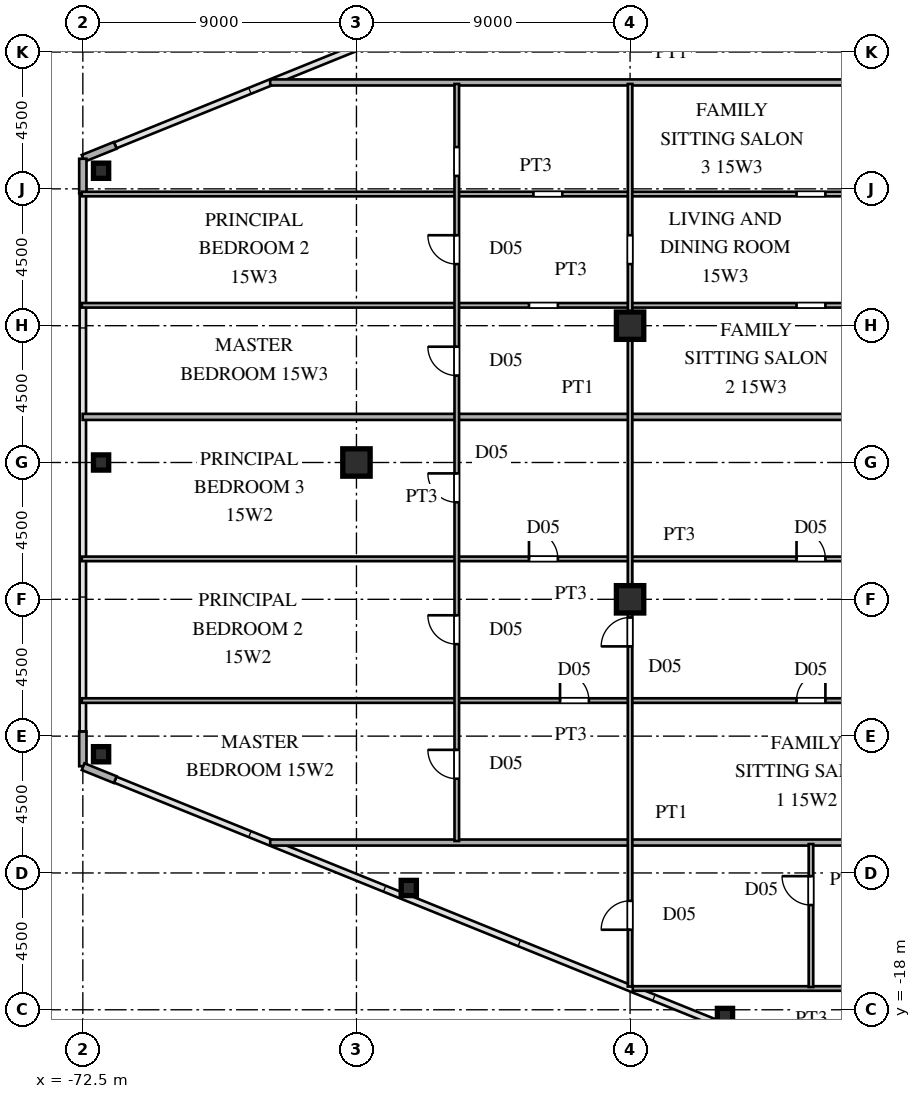
"""IFC4 building model, lengths in metres.
Left out: names, types, materials, properties, quantities, classifications, styles, units other than length and angle.
Written with IfcOpenShell. Run it as: python <this file> out.ifc"""

import sys

from ifc_helpers import new_model, si_unit, direction, frame, frame_2d, origin, origin_2d, place, context, subcontext, project, spatial, rectangle, hollow_rectangle, i_section, extrude, source, transform, mapped, element, fill, save


model = new_model("IFC4")
c1 = context("Model", 3, precision=1e-05, world=origin(), true_north=direction((0.0, 1.0)))
c2 = subcontext(c1, "Body", "Model", "MODEL_VIEW")
j1 = project(units=[si_unit("LENGTHUNIT", "METRE"), si_unit("PLANEANGLEUNIT", "RADIAN")], contexts=[c1])
p1 = place(None, origin())
s1 = spatial("IfcSite", under=j1, at=p1, CompositionType="ELEMENT")
p2 = place(p1, origin())
s2 = spatial("IfcBuilding", under=s1, at=p2, CompositionType="ELEMENT")
p3 = place(p2, frame((0.0, 0.0, 58.5)))
s3 = spatial("IfcBuildingStorey", under=s2, at=p3, CompositionType="ELEMENT", Elevation=58.5)
m1 = source(origin(), c2, "Body", "SweptSolid", [
    extrude(i_section(OverallWidth=0.9, OverallDepth=0.9, WebThickness=0.036, FlangeThickness=0.055, at=origin_2d()), origin(), (0.0, 0.0, 1.0), 3.6),
])
for number, where, z_axis, x_axis in (
    (1, (-54.5, -4.5, 0.0), (0.0, 0.0, 1.0), (1.0, 0.0, 0.0)),
    (2, (-54.5, 4.5, 0.0), (0.0, 0.0, 1.0), (1.0, 0.0, 0.0)),
    (3, (-63.5, 0.0, 0.0), (0.0, 0.0, 1.0), (1.0, 0.0, 0.0)),
):
    element("IfcColumn", number, at=place(p3, frame(where, z_axis=z_axis, x_axis=x_axis)), inside=s3, PredefinedType="COLUMN", context=c2, shape_type="MappedRepresentation", body=[
        mapped(m1, transform((0.0, 0.0, 0.0), scale=1.0)),
    ])
m2 = source(origin(), c2, "Body", "SweptSolid", [
    extrude(hollow_rectangle(XDim=0.5, YDim=0.5, WallThickness=0.02, at=origin_2d()), origin(), (0.0, 0.0, 1.0), 3.6),
])
for number, where, z_axis, x_axis in (
    (4, (-71.9, 9.596, 0.0), (0.0, 0.0, 1.0), (1.0, 0.0, 0.0)),
    (5, (-71.9, -9.596, 0.0), (0.0, 0.0, 1.0), (1.0, 0.0, 0.0)),
    (6, (-51.378, -18.204, 0.0), (0.0, 0.0, 1.0), (1.0, 0.0, 0.0)),
    (7, (-61.779, -13.994, 0.0), (0.0, 0.0, 1.0), (1.0, 0.0, 0.0)),
    (8, (-71.9, 0.0, 0.0), (0.0, 0.0, 1.0), (1.0, 0.0, 0.0)),
):
    element("IfcColumn", number, at=place(p3, frame(where, z_axis=z_axis, x_axis=x_axis)), inside=s3, PredefinedType="COLUMN", context=c2, shape_type="MappedRepresentation", body=[
        mapped(m2, transform((0.0, 0.0, 0.0), scale=1.0)),
    ])
for number, where, z_axis, x_axis in (
    (9, (-71.434, 10.431, 0.0), (0.0, 0.0, 1.0), (-0.927, -0.375, 0.0)),
    (10, (-72.5, 9.99, 0.0), (0.0, 0.0, 1.0), (0.0, -1.0, 0.0)),
    (11, (-72.5, -8.85, 0.0), (0.0, 0.0, 1.0), (0.0, -1.0, 0.0)),
    (12, (-72.491, -10.004, 0.0), (0.0, 0.0, 1.0), (0.927, -0.375, 0.0)),
):
    element("IfcWall", number, at=place(p3, frame(where, z_axis=z_axis, x_axis=x_axis)), inside=s3, PredefinedType="SOLIDWALL", context=c2, shape_type="SweptSolid", body=[
        extrude(rectangle(XDim=1.14, YDim=0.24, at=frame_2d((0.57, 0.0))), origin(), (0.0, 0.0, 1.0), 3.38),
    ])
p4 = place(p3, frame((-54.412, -17.3, 0.0), z_axis=(0.0, 0.0, 1.0), x_axis=(1.0, 0.0, 0.0)))
e13 = element("IfcWall", 13, at=p4, inside=s3, PredefinedType="PARTITIONING", context=c2, shape_type="SweptSolid", body=[
    extrude(rectangle(XDim=11.762, YDim=0.15, at=frame_2d((5.881, 0.0))), origin(), (0.0, 0.0, 1.0), 3.38),
])
p5 = place(p4, frame((8.362, 0.0, 0.0)))
e14 = element("IfcOpeningElement", 14, at=p5, cuts=e13, PredefinedType="OPENING", context=c2, shape_type="SweptSolid", body=[
    extrude(rectangle(XDim=0.95, YDim=2.15, at=frame_2d((0.475, 1.075))), frame((0.0, 0.085, 0.0), z_axis=(0.0, -1.0, 0.0), x_axis=(1.0, 0.0, 0.0)), (0.0, 0.0, 1.0), 0.17),
])
p6 = place(p3, frame((-66.337, -12.5, 0.0), z_axis=(0.0, 0.0, 1.0), x_axis=(1.0, 0.0, 0.0)))
e15 = element("IfcWall", 15, at=p6, inside=s3, PredefinedType="PARTITIONING", context=c2, shape_type="SweptSolid", body=[
    extrude(rectangle(XDim=26.407, YDim=0.2, at=frame_2d((13.204, 0.0))), origin(), (0.0, 0.0, 1.0), 3.38),
])
p7 = place(p3, frame((-72.535, -7.83, 0.0), z_axis=(0.0, 0.0, 1.0), x_axis=(1.0, 0.0, 0.0)))
e16 = element("IfcWall", 16, at=p7, inside=s3, PredefinedType="PARTITIONING", context=c2, shape_type="SweptSolid", body=[
    extrude(rectangle(XDim=29.885, YDim=0.15, at=frame_2d((14.942, 0.0))), origin(), (0.0, 0.0, 1.0), 3.38),
])
p8 = place(p7, frame((23.51, 0.0, 0.0)))
e17 = element("IfcOpeningElement", 17, at=p8, cuts=e16, PredefinedType="OPENING", context=c2, shape_type="SweptSolid", body=[
    extrude(rectangle(XDim=0.95, YDim=2.15, at=frame_2d((0.475, 1.075))), frame((0.0, 0.085, 0.0), z_axis=(0.0, -1.0, 0.0), x_axis=(1.0, 0.0, 0.0)), (0.0, 0.0, 1.0), 0.17),
])
p9 = place(p7, frame((15.731, 0.0, 0.0)))
e18 = element("IfcOpeningElement", 18, at=p9, cuts=e16, PredefinedType="OPENING", context=c2, shape_type="SweptSolid", body=[
    extrude(rectangle(XDim=0.95, YDim=2.15, at=frame_2d((0.475, 1.075))), frame((0.0, 0.085, 0.0), z_axis=(0.0, -1.0, 0.0), x_axis=(1.0, 0.0, 0.0)), (0.0, 0.0, 1.0), 0.17),
])
p10 = place(p3, frame((-72.535, -3.17, 0.0), z_axis=(0.0, 0.0, 1.0), x_axis=(1.0, 0.0, 0.0)))
e19 = element("IfcWall", 19, at=p10, inside=s3, PredefinedType="PARTITIONING", context=c2, shape_type="SweptSolid", body=[
    extrude(rectangle(XDim=29.885, YDim=0.15, at=frame_2d((14.942, 0.0))), origin(), (0.0, 0.0, 1.0), 3.38),
])
p11 = place(p10, frame((23.51, 0.0, 0.0)))
e20 = element("IfcOpeningElement", 20, at=p11, cuts=e19, PredefinedType="OPENING", context=c2, shape_type="SweptSolid", body=[
    extrude(rectangle(XDim=0.95, YDim=2.15, at=frame_2d((0.475, 1.075))), frame((0.0, 0.085, 0.0), z_axis=(0.0, -1.0, 0.0), x_axis=(1.0, 0.0, 0.0)), (0.0, 0.0, 1.0), 0.17),
])
p12 = place(p10, frame((14.71, 0.0, 0.0)))
e21 = element("IfcOpeningElement", 21, at=p12, cuts=e19, PredefinedType="OPENING", context=c2, shape_type="SweptSolid", body=[
    extrude(rectangle(XDim=0.95, YDim=2.15, at=frame_2d((0.475, 1.075))), frame((0.0, 0.085, 0.0), z_axis=(0.0, -1.0, 0.0), x_axis=(1.0, 0.0, 0.0)), (0.0, 0.0, 1.0), 0.17),
])
p13 = place(p3, frame((-72.505, 1.5, 0.0), z_axis=(0.0, 0.0, 1.0), x_axis=(1.0, 0.0, 0.0)))
e22 = element("IfcWall", 22, at=p13, inside=s3, PredefinedType="PARTITIONING", context=c2, shape_type="SweptSolid", body=[
    extrude(rectangle(XDim=32.575, YDim=0.2, at=frame_2d((16.288, 0.0))), origin(), (0.0, 0.0, 1.0), 3.38),
])
p14 = place(p3, frame((-72.535, 5.17, 0.0), z_axis=(0.0, 0.0, 1.0), x_axis=(1.0, 0.0, 0.0)))
e23 = element("IfcWall", 23, at=p14, inside=s3, PredefinedType="PARTITIONING", context=c2, shape_type="SweptSolid", body=[
    extrude(rectangle(XDim=29.885, YDim=0.15, at=frame_2d((14.942, 0.0))), origin(), (0.0, 0.0, 1.0), 3.38),
])
p15 = place(p14, frame((23.51, 0.0, 0.0)))
e24 = element("IfcOpeningElement", 24, at=p15, cuts=e23, PredefinedType="OPENING", context=c2, shape_type="SweptSolid", body=[
    extrude(rectangle(XDim=0.95, YDim=2.15, at=frame_2d((0.475, 1.075))), frame((0.0, 0.085, 0.0), z_axis=(0.0, -1.0, 0.0), x_axis=(1.0, 0.0, 0.0)), (0.0, 0.0, 1.0), 0.17),
])
p16 = place(p14, frame((14.71, 0.0, 0.0)))
e25 = element("IfcOpeningElement", 25, at=p16, cuts=e23, PredefinedType="OPENING", context=c2, shape_type="SweptSolid", body=[
    extrude(rectangle(XDim=0.95, YDim=2.15, at=frame_2d((0.475, 1.075))), frame((0.0, 0.085, 0.0), z_axis=(0.0, -1.0, 0.0), x_axis=(1.0, 0.0, 0.0)), (0.0, 0.0, 1.0), 0.17),
])
p17 = place(p3, frame((-72.535, 8.83, 0.0), z_axis=(0.0, 0.0, 1.0), x_axis=(1.0, 0.0, 0.0)))
e26 = element("IfcWall", 26, at=p17, inside=s3, PredefinedType="PARTITIONING", context=c2, shape_type="SweptSolid", body=[
    extrude(rectangle(XDim=29.885, YDim=0.15, at=frame_2d((14.942, 0.0))), origin(), (0.0, 0.0, 1.0), 3.38),
])
p18 = place(p17, frame((23.51, 0.0, 0.0)))
e27 = element("IfcOpeningElement", 27, at=p18, cuts=e26, PredefinedType="OPENING", context=c2, shape_type="SweptSolid", body=[
    extrude(rectangle(XDim=0.95, YDim=2.15, at=frame_2d((0.475, 1.075))), frame((0.0, 0.085, 0.0), z_axis=(0.0, -1.0, 0.0), x_axis=(1.0, 0.0, 0.0)), (0.0, 0.0, 1.0), 0.17),
])
p19 = place(p17, frame((14.856, 0.0, 0.0)))
e28 = element("IfcOpeningElement", 28, at=p19, cuts=e26, PredefinedType="OPENING", context=c2, shape_type="SweptSolid", body=[
    extrude(rectangle(XDim=0.95, YDim=2.15, at=frame_2d((0.475, 1.075))), frame((0.0, 0.085, 0.0), z_axis=(0.0, -1.0, 0.0), x_axis=(1.0, 0.0, 0.0)), (0.0, 0.0, 1.0), 0.17),
])
p20 = place(p3, frame((-66.337, 12.5, 0.0), z_axis=(0.0, 0.0, 1.0), x_axis=(1.0, 0.0, 0.0)))
e29 = element("IfcWall", 29, at=p20, inside=s3, PredefinedType="PARTITIONING", context=c2, shape_type="SweptSolid", body=[
    extrude(rectangle(XDim=26.407, YDim=0.2, at=frame_2d((13.204, 0.0))), origin(), (0.0, 0.0, 1.0), 3.38),
])
p21 = place(p3, frame((-60.2, -12.45, 0.0), z_axis=(0.0, 0.0, 1.0), x_axis=(0.0, 1.0, 0.0)))
e30 = element("IfcWall", 30, at=p21, inside=s3, PredefinedType="PARTITIONING", context=c2, shape_type="SweptSolid", body=[
    extrude(rectangle(XDim=24.9, YDim=0.15, at=frame_2d((12.45, 0.0))), origin(), (0.0, 0.0, 1.0), 3.38),
])
p22 = place(p21, frame((2.049, 0.0, 0.0)))
e31 = element("IfcOpeningElement", 31, at=p22, cuts=e30, PredefinedType="OPENING", context=c2, shape_type="SweptSolid", body=[
    extrude(rectangle(XDim=0.95, YDim=2.15, at=frame_2d((0.475, 1.075))), frame((0.0, 0.085, 0.0), z_axis=(0.0, -1.0, 0.0), x_axis=(1.0, 0.0, 0.0)), (0.0, 0.0, 1.0), 0.17),
])
p23 = place(p21, frame((6.475, 0.0, 0.0)))
e32 = element("IfcOpeningElement", 32, at=p23, cuts=e30, PredefinedType="OPENING", context=c2, shape_type="SweptSolid", body=[
    extrude(rectangle(XDim=0.95, YDim=2.15, at=frame_2d((0.475, 1.075))), frame((0.0, 0.085, 0.0), z_axis=(0.0, -1.0, 0.0), x_axis=(1.0, 0.0, 0.0)), (0.0, 0.0, 1.0), 0.17),
])
p24 = place(p21, frame((11.142, 0.0, 0.0)))
e33 = element("IfcOpeningElement", 33, at=p24, cuts=e30, PredefinedType="OPENING", context=c2, shape_type="SweptSolid", body=[
    extrude(rectangle(XDim=0.95, YDim=2.15, at=frame_2d((0.475, 1.075))), frame((0.0, 0.085, 0.0), z_axis=(0.0, -1.0, 0.0), x_axis=(1.0, 0.0, 0.0)), (0.0, 0.0, 1.0), 0.17),
])
p25 = place(p21, frame((15.308, 0.0, 0.0)))
e34 = element("IfcOpeningElement", 34, at=p25, cuts=e30, PredefinedType="OPENING", context=c2, shape_type="SweptSolid", body=[
    extrude(rectangle(XDim=0.95, YDim=2.15, at=frame_2d((0.475, 1.075))), frame((0.0, 0.085, 0.0), z_axis=(0.0, -1.0, 0.0), x_axis=(1.0, 0.0, 0.0)), (0.0, 0.0, 1.0), 0.17),
])
p26 = place(p21, frame((18.975, 0.0, 0.0)))
e35 = element("IfcOpeningElement", 35, at=p26, cuts=e30, PredefinedType="OPENING", context=c2, shape_type="SweptSolid", body=[
    extrude(rectangle(XDim=0.95, YDim=2.15, at=frame_2d((0.475, 1.075))), frame((0.0, 0.085, 0.0), z_axis=(0.0, -1.0, 0.0), x_axis=(1.0, 0.0, 0.0)), (0.0, 0.0, 1.0), 0.17),
])
p27 = place(p21, frame((21.875, 0.0, 0.0)))
e36 = element("IfcOpeningElement", 36, at=p27, cuts=e30, PredefinedType="OPENING", context=c2, shape_type="SweptSolid", body=[
    extrude(rectangle(XDim=0.95, YDim=2.15, at=frame_2d((0.475, 1.075))), frame((0.0, 0.085, 0.0), z_axis=(0.0, -1.0, 0.0), x_axis=(1.0, 0.0, 0.0)), (0.0, 0.0, 1.0), 0.17),
])
p28 = place(p3, frame((-54.5, -17.236, 0.0), z_axis=(0.0, 0.0, 1.0), x_axis=(0.0, 1.0, 0.0)))
e37 = element("IfcWall", 37, at=p28, inside=s3, PredefinedType="PARTITIONING", context=c2, shape_type="SweptSolid", body=[
    extrude(rectangle(XDim=29.686, YDim=0.15, at=frame_2d((14.843, 0.0))), origin(), (0.0, 0.0, 1.0), 2.68),
])
p29 = place(p28, frame((1.868, 0.0, 0.0)))
e38 = element("IfcOpeningElement", 38, at=p29, cuts=e37, PredefinedType="OPENING", context=c2, shape_type="SweptSolid", body=[
    extrude(rectangle(XDim=0.95, YDim=2.15, at=frame_2d((0.475, 1.075))), frame((0.0, 0.085, 0.0), z_axis=(0.0, -1.0, 0.0), x_axis=(1.0, 0.0, 0.0)), (0.0, 0.0, 1.0), 0.17),
])
p30 = place(p28, frame((11.188, 0.0, 0.0)))
e39 = element("IfcOpeningElement", 39, at=p30, cuts=e37, PredefinedType="OPENING", context=c2, shape_type="SweptSolid", body=[
    extrude(rectangle(XDim=0.95, YDim=2.15, at=frame_2d((0.475, 1.075))), frame((0.0, 0.085, 0.0), z_axis=(0.0, -1.0, 0.0), x_axis=(1.0, 0.0, 0.0)), (0.0, 0.0, 1.0), 0.17),
])
p31 = place(p28, frame((23.761, 0.0, 0.0)))
e40 = element("IfcOpeningElement", 40, at=p31, cuts=e37, PredefinedType="OPENING", context=c2, shape_type="SweptSolid", body=[
    extrude(rectangle(XDim=0.95, YDim=2.15, at=frame_2d((0.475, 1.075))), frame((0.0, 0.085, 0.0), z_axis=(0.0, -1.0, 0.0), x_axis=(1.0, 0.0, 0.0)), (0.0, 0.0, 1.0), 0.17),
])
p32 = place(p3, frame((-48.55, -17.251, 0.0), z_axis=(0.0, 0.0, 1.0), x_axis=(0.0, 1.0, 0.0)))
e41 = element("IfcWall", 41, at=p32, inside=s3, PredefinedType="PARTITIONING", context=c2, shape_type="SweptSolid", body=[
    extrude(rectangle(XDim=4.701, YDim=0.15, at=frame_2d((2.351, 0.0))), origin(), (0.0, 0.0, 1.0), 3.38),
])
p33 = place(p32, frame((2.696, 0.0, 0.0)))
e42 = element("IfcOpeningElement", 42, at=p33, cuts=e41, PredefinedType="OPENING", context=c2, shape_type="SweptSolid", body=[
    extrude(rectangle(XDim=0.95, YDim=2.15, at=frame_2d((0.475, 1.075))), frame((0.0, 0.085, 0.0), z_axis=(0.0, -1.0, 0.0), x_axis=(1.0, 0.0, 0.0)), (0.0, 0.0, 1.0), 0.17),
])
m3 = source(origin(), c2, "Body", "SweptSolid", [
    extrude(rectangle(XDim=0.95, YDim=2.15, at=frame_2d((0.475, 1.075))), frame((0.0, 0.025, 0.0), z_axis=(0.0, -1.0, 0.0), x_axis=(1.0, 0.0, 0.0)), (0.0, 0.0, 1.0), 0.05),
])
p34 = place(p8, origin())
e43 = element("IfcDoor", 43, at=p34, inside=s3, OperationType="SINGLE_SWING_RIGHT", PredefinedType="DOOR", context=c2, shape_type="MappedRepresentation", body=[
    mapped(m3, transform((0.0, 0.0, 0.0), scale=1.0)),
])
fill(e17, e43)
p35 = place(p9, origin())
e44 = element("IfcDoor", 44, at=p35, inside=s3, OperationType="SINGLE_SWING_LEFT", PredefinedType="DOOR", context=c2, shape_type="MappedRepresentation", body=[
    mapped(m3, transform((0.0, 0.0, 0.0), scale=1.0)),
])
fill(e18, e44)
p36 = place(p11, origin())
e45 = element("IfcDoor", 45, at=p36, inside=s3, OperationType="SINGLE_SWING_LEFT", PredefinedType="DOOR", context=c2, shape_type="MappedRepresentation", body=[
    mapped(m3, transform((0.0, 0.0, 0.0), scale=1.0)),
])
fill(e20, e45)
p37 = place(p12, origin())
e46 = element("IfcDoor", 46, at=p37, inside=s3, OperationType="SINGLE_SWING_LEFT", PredefinedType="DOOR", context=c2, shape_type="MappedRepresentation", body=[
    mapped(m3, transform((0.0, 0.0, 0.0), scale=1.0)),
])
fill(e21, e46)
p38 = place(p22, origin())
e47 = element("IfcDoor", 47, at=p38, inside=s3, OperationType="SINGLE_SWING_RIGHT", PredefinedType="DOOR", context=c2, shape_type="MappedRepresentation", body=[
    mapped(m3, transform((0.0, 0.0, 0.0), scale=1.0)),
])
fill(e31, e47)
p39 = place(p23, origin())
e48 = element("IfcDoor", 48, at=p39, inside=s3, OperationType="SINGLE_SWING_RIGHT", PredefinedType="DOOR", context=c2, shape_type="MappedRepresentation", body=[
    mapped(m3, transform((0.0, 0.0, 0.0), scale=1.0)),
])
fill(e32, e48)
p40 = place(p24, origin())
e49 = element("IfcDoor", 49, at=p40, inside=s3, OperationType="SINGLE_SWING_RIGHT", PredefinedType="DOOR", context=c2, shape_type="MappedRepresentation", body=[
    mapped(m3, transform((0.0, 0.0, 0.0), scale=1.0)),
])
fill(e33, e49)
p41 = place(p25, origin())
e50 = element("IfcDoor", 50, at=p41, inside=s3, OperationType="SINGLE_SWING_RIGHT", PredefinedType="DOOR", context=c2, shape_type="MappedRepresentation", body=[
    mapped(m3, transform((0.0, 0.0, 0.0), scale=1.0)),
])
fill(e34, e50)
p42 = place(p26, origin())
e51 = element("IfcDoor", 51, at=p42, inside=s3, OperationType="SINGLE_SWING_RIGHT", PredefinedType="DOOR", context=c2, shape_type="MappedRepresentation", body=[
    mapped(m3, transform((0.0, 0.0, 0.0), scale=1.0)),
])
fill(e35, e51)
p43 = place(p29, origin())
e52 = element("IfcDoor", 52, at=p43, inside=s3, OperationType="SINGLE_SWING_LEFT", PredefinedType="DOOR", context=c2, shape_type="MappedRepresentation", body=[
    mapped(m3, transform((0.0, 0.0, 0.0), scale=1.0)),
])
fill(e38, e52)
p44 = place(p30, origin())
e53 = element("IfcDoor", 53, at=p44, inside=s3, OperationType="SINGLE_SWING_LEFT", PredefinedType="DOOR", context=c2, shape_type="MappedRepresentation", body=[
    mapped(m3, transform((0.0, 0.0, 0.0), scale=1.0)),
])
fill(e39, e53)
p45 = place(p33, origin())
e54 = element("IfcDoor", 54, at=p45, inside=s3, OperationType="SINGLE_SWING_RIGHT", PredefinedType="DOOR", context=c2, shape_type="MappedRepresentation", body=[
    mapped(m3, transform((0.0, 0.0, 0.0), scale=1.0)),
])
fill(e42, e54)
save(model, sys.argv[1])
